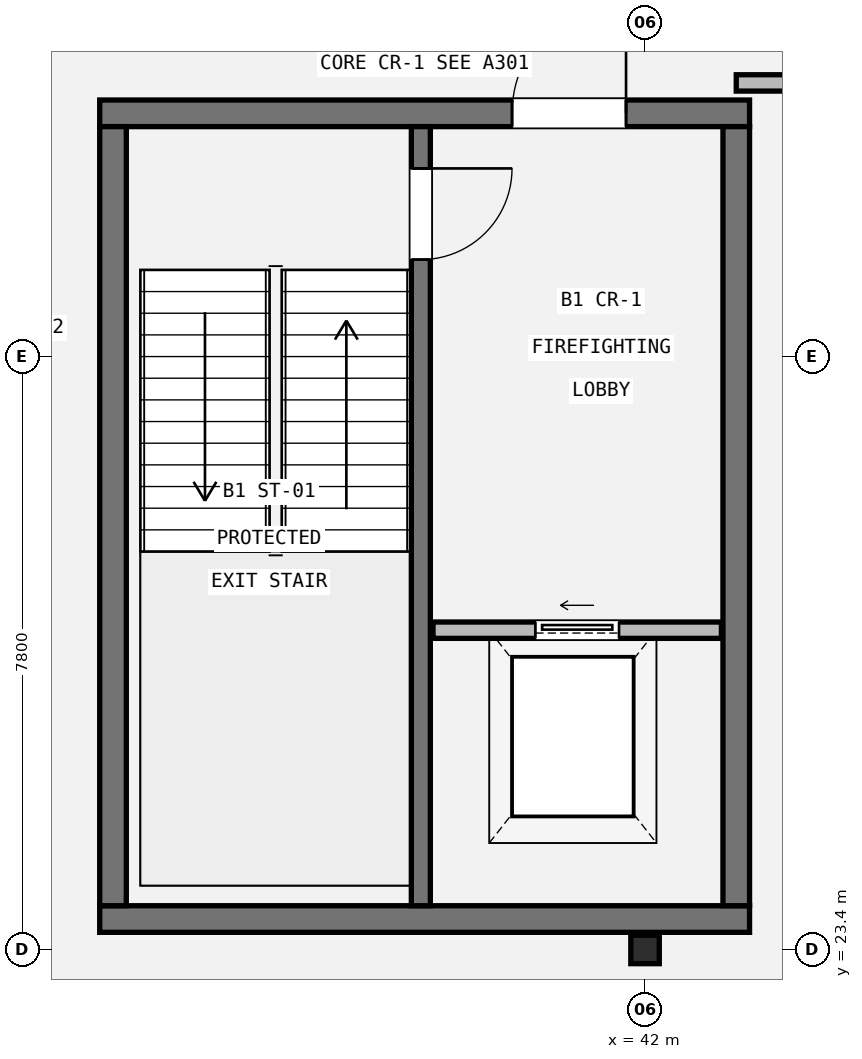
"""IFC4 building model, lengths in metres.
Left out: names, types, materials, properties, quantities, classifications, styles, units other than length and angle.
Written with IfcOpenShell. Run it as: python <this file> out.ifc"""

import sys

from ifc_helpers import new_model, si_unit, direction, frame, frame_2d, origin, origin_2d, place, context, subcontext, project, spatial, rectangle, i_section, extrude, element, fill, save


model = new_model("IFC4")
c1 = context("Model", 3, precision=1e-05, world=origin(), true_north=direction((0.0, 1.0)))
c2 = subcontext(c1, "Body", "Model", "MODEL_VIEW")
j1 = project(units=[si_unit("LENGTHUNIT", "METRE"), si_unit("PLANEANGLEUNIT", "RADIAN")], contexts=[c1])
p1 = place(None, origin())
s1 = spatial("IfcSite", under=j1, at=p1, CompositionType="ELEMENT")
p2 = place(p1, origin())
s2 = spatial("IfcBuilding", under=s1, at=p2, CompositionType="ELEMENT")
p3 = place(p2, frame((0.0, 0.0, -4.5)))
s3 = spatial("IfcBuildingStorey", under=s2, at=p3, CompositionType="ELEMENT", Elevation=-4.5)
p4 = place(p3, frame((42.0, 23.4, 0.0), z_axis=(0.0, 0.0, 1.0), x_axis=(1.0, 0.0, 0.0)))
e1 = element("IfcColumn", 1, at=p4, inside=s3, PredefinedType="COLUMN", context=c2, shape_type="SweptSolid", body=[
    extrude(i_section(OverallWidth=0.375, OverallDepth=0.375, WebThickness=0.017, FlangeThickness=0.027, FilletRadius=0.015, at=origin_2d()), origin(), (0.0, 0.0, 1.0), 4.5),
])
p5 = place(p3, frame((43.375, 23.8, 0.0), z_axis=(0.0, 0.0, 1.0), x_axis=(-1.0, 0.0, 0.0)))
e2 = element("IfcWall", 2, at=p5, inside=s3, PredefinedType="SHEAR", context=c2, shape_type="SweptSolid", body=[
    extrude(rectangle(XDim=8.55, YDim=0.35, at=frame_2d((4.275, 0.0))), origin(), (0.0, 0.0, 1.0), 4.25),
])
p6 = place(p3, frame((34.825, 34.4, 0.0), z_axis=(0.0, 0.0, 1.0), x_axis=(1.0, 0.0, 0.0)))
e3 = element("IfcWall", 3, at=p6, inside=s3, PredefinedType="SHEAR", context=c2, shape_type="SweptSolid", body=[
    extrude(rectangle(XDim=8.55, YDim=0.35, at=frame_2d((4.275, 0.0))), origin(), (0.0, 0.0, 1.0), 4.25),
])
p7 = place(p6, frame((5.425, 0.0, 0.0)))
e4 = element("IfcOpeningElement", 4, at=p7, cuts=e3, PredefinedType="OPENING", context=c2, shape_type="SweptSolid", body=[
    extrude(rectangle(XDim=1.5, YDim=2.15, at=frame_2d((0.75, 1.075))), frame((0.0, 0.185, 0.0), z_axis=(0.0, -1.0, 0.0), x_axis=(1.0, 0.0, 0.0)), (0.0, 0.0, 1.0), 0.37),
])
for number, where, z_axis, x_axis in (
    (5, (35.0, 23.975, 0.0), (0.0, 0.0, 1.0), (0.0, 1.0, 0.0)),
    (6, (43.2, 34.225, 0.0), (0.0, 0.0, 1.0), (0.0, -1.0, 0.0)),
):
    element("IfcWall", number, at=place(p3, frame(where, z_axis=z_axis, x_axis=x_axis)), inside=s3, PredefinedType="SHEAR", context=c2, shape_type="SweptSolid", body=[
        extrude(rectangle(XDim=10.25, YDim=0.35, at=frame_2d((5.125, 0.0))), origin(), (0.0, 0.0, 1.0), 4.25),
    ])
p8 = place(p3, frame((39.05, 34.225, 0.0), z_axis=(0.0, 0.0, 1.0), x_axis=(0.0, -1.0, 0.0)))
e7 = element("IfcWall", 7, at=p8, inside=s3, PredefinedType="SHEAR", context=c2, shape_type="SweptSolid", body=[
    extrude(rectangle(XDim=10.25, YDim=0.25, at=frame_2d((5.125, 0.0))), origin(), (0.0, 0.0, 1.0), 4.25),
])
p9 = place(p8, frame((0.55, 0.0, 0.0)))
e8 = element("IfcOpeningElement", 8, at=p9, cuts=e7, PredefinedType="OPENING", context=c2, shape_type="SweptSolid", body=[
    extrude(rectangle(XDim=1.2, YDim=2.15, at=frame_2d((0.6, 1.075))), frame((0.0, 0.135, 0.0), z_axis=(0.0, -1.0, 0.0), x_axis=(1.0, 0.0, 0.0)), (0.0, 0.0, 1.0), 0.27),
])
p10 = place(p3, frame((39.21, 27.6, 0.0), z_axis=(0.0, 0.0, 1.0), x_axis=(1.0, 0.0, 0.0)))
e9 = element("IfcWall", 9, at=p10, inside=s3, PredefinedType="STANDARD", context=c2, shape_type="SweptSolid", body=[
    extrude(rectangle(XDim=3.795, YDim=0.215, at=frame_2d((1.897, 0.0))), origin(), (0.0, 0.0, 1.0), 4.242),
])
p11 = place(p10, frame((1.347, 0.0, 0.0)))
e10 = element("IfcOpeningElement", 10, at=p11, cuts=e9, PredefinedType="OPENING", context=c2, shape_type="SweptSolid", body=[
    extrude(rectangle(XDim=1.1, YDim=2.2, at=frame_2d((0.55, 1.1))), frame((0.0, 0.117, 0.0), z_axis=(0.0, -1.0, 0.0), x_axis=(1.0, 0.0, 0.0)), (0.0, 0.0, 1.0), 0.235),
])
p12 = place(p3, frame((43.2, 34.8, 0.0), z_axis=(0.0, 0.0, 1.0), x_axis=(1.0, 0.0, 0.0)))
e11 = element("IfcWall", 11, at=p12, inside=s3, PredefinedType="STANDARD", context=c2, shape_type="SweptSolid", body=[
    extrude(rectangle(XDim=15.3, YDim=0.215, at=frame_2d((7.65, 0.0))), origin(), (0.0, 0.0, 1.0), 3.759),
])
p13 = place(p12, frame((4.257, 0.0, 0.0)))
e12 = element("IfcOpeningElement", 12, at=p13, cuts=e11, PredefinedType="OPENING", context=c2, shape_type="SweptSolid", body=[
    extrude(rectangle(XDim=2.4, YDim=2.7, at=frame_2d((1.2, 1.35))), frame((0.0, 0.117, 0.0), z_axis=(0.0, -1.0, 0.0), x_axis=(1.0, 0.0, 0.0)), (0.0, 0.0, 1.0), 0.235),
])
p14 = place(p9, origin())
e13 = element("IfcDoor", 13, at=p14, inside=s3, OperationType="SINGLE_SWING_LEFT", PredefinedType="DOOR", context=c2, shape_type="SweptSolid", body=[
    extrude(rectangle(XDim=1.2, YDim=2.15, at=frame_2d((0.6, 1.075))), frame((0.0, 0.025, 0.0), z_axis=(0.0, -1.0, 0.0), x_axis=(1.0, 0.0, 0.0)), (0.0, 0.0, 1.0), 0.05),
])
fill(e8, e13)
p15 = place(p7, origin())
e14 = element("IfcDoor", 14, at=p15, inside=s3, OperationType="SINGLE_SWING_RIGHT", PredefinedType="DOOR", context=c2, shape_type="SweptSolid", body=[
    extrude(rectangle(XDim=1.5, YDim=2.15, at=frame_2d((0.75, 1.075))), frame((0.0, 0.025, 0.0), z_axis=(0.0, -1.0, 0.0), x_axis=(1.0, 0.0, 0.0)), (0.0, 0.0, 1.0), 0.05),
])
fill(e4, e14)
p16 = place(p11, origin())
e15 = element("IfcDoor", 15, at=p16, inside=s3, OperationType="SLIDING_TO_LEFT", PredefinedType="DOOR", context=c2, shape_type="SweptSolid", body=[
    extrude(rectangle(XDim=1.1, YDim=2.2, at=frame_2d((0.55, 1.1))), frame((0.0, 0.025, 0.0), z_axis=(0.0, -1.0, 0.0), x_axis=(1.0, 0.0, 0.0)), (0.0, 0.0, 1.0), 0.05),
])
fill(e10, e15)
save(model, sys.argv[1])
